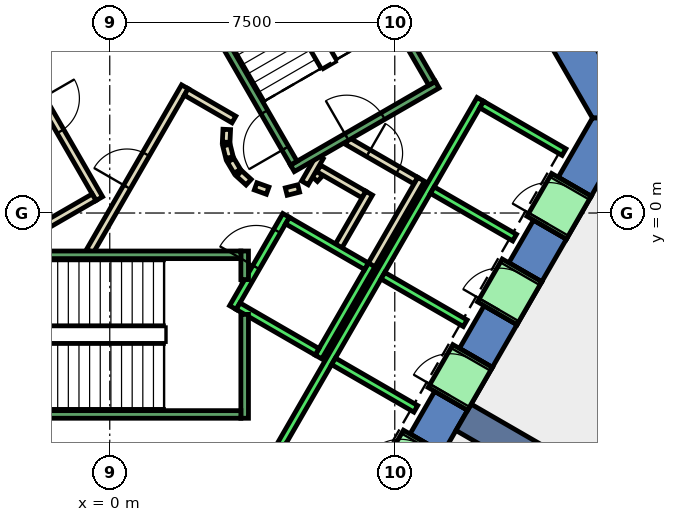
"""IFC4 building model, lengths in metres.
Left out: names, types, materials, properties, quantities, classifications, styles, units other than length and angle.
Written with IfcOpenShell. Run it as: python <this file> out.ifc"""

import sys

from ifc_helpers import new_model, si_unit, direction, frame, frame_2d, origin, place, context, subcontext, project, spatial, polyline, rectangle, outline, extrude, element, fill, save


model = new_model("IFC4")
c1 = context("Model", 3, precision=1e-05, world=origin(), true_north=direction((0.0, 1.0)))
c2 = subcontext(c1, "Body", "Model", "MODEL_VIEW")
j1 = project(units=[si_unit("LENGTHUNIT", "METRE"), si_unit("PLANEANGLEUNIT", "RADIAN")], contexts=[c1])
p1 = place(None, origin())
s1 = spatial("IfcSite", under=j1, at=p1, CompositionType="ELEMENT")
p2 = place(p1, origin())
s2 = spatial("IfcBuilding", under=s1, at=p2, CompositionType="ELEMENT")
p3 = place(p2, frame((0.0, 0.0, 60.2)))
s3 = spatial("IfcBuildingStorey", under=s2, at=p3, CompositionType="ELEMENT", Elevation=60.2)
p4 = place(p3, frame((0.0, 0.0, -0.4)))
e1 = element("IfcWall", 1, at=p4, inside=s3, PredefinedType="SHEAR", context=c2, shape_type="SweptSolid", body=[
    extrude(outline(polyline([(8.517, 11.748), (7.651, 11.248), (12.702, 2.5), (13.856, 2.5), (8.517, 11.748)])), origin(), (0.0, 0.0, 1.0), 4.2),
])
p5 = place(p3, frame((0.0, 0.0, -0.4)))
e2 = element("IfcWall", 2, at=p5, inside=s3, PredefinedType="SHEAR", context=c2, shape_type="SweptSolid", body=[
    extrude(outline(polyline([(9.417, -5.189), (8.551, -4.689), (7.902, -5.814), (8.767, -6.314), (9.417, -5.189)])), origin(), (0.0, 0.0, 1.0), 4.2),
])
p6 = place(p3, frame((0.0, 0.0, -0.4)))
e3 = element("IfcWall", 3, at=p6, inside=s3, PredefinedType="SHEAR", context=c2, shape_type="SweptSolid", body=[
    extrude(outline(polyline([(10.717, -2.937), (9.851, -2.437), (9.201, -3.563), (10.067, -4.063), (10.717, -2.937)])), origin(), (0.0, 0.0, 1.0), 4.2),
])
p7 = place(p3, frame((0.0, 0.0, -0.4)))
e4 = element("IfcWall", 4, at=p7, inside=s3, PredefinedType="SHEAR", context=c2, shape_type="SweptSolid", body=[
    extrude(outline(polyline([(12.017, -0.686), (11.151, -0.186), (10.501, -1.311), (11.367, -1.811), (12.017, -0.686)])), origin(), (0.0, 0.0, 1.0), 4.2),
])
p8 = place(p3, frame((0.0, 0.0, -0.4)))
e5 = element("IfcWall", 5, at=p8, inside=s3, PredefinedType="SHEAR", context=c2, shape_type="SweptSolid", body=[
    extrude(outline(polyline([(11.801, 0.94), (12.667, 0.44), (13.856, 2.5), (12.702, 2.5), (11.801, 0.94)])), origin(), (0.0, 0.0, 1.0), 4.2),
])
p9 = place(p3, frame((0.0, 0.0, 3.6)))
e6 = element("IfcWall", 6, at=p9, inside=s3, PredefinedType="SHEAR", context=c2, shape_type="SweptSolid", body=[
    extrude(outline(polyline([(8.767, -6.314), (7.902, -5.814), (7.252, -6.94), (8.117, -7.44), (8.767, -6.314)])), origin(), (0.0, 0.0, 1.0), 0.2),
])
p10 = place(p3, frame((0.0, 0.0, 3.6)))
e7 = element("IfcWall", 7, at=p10, inside=s3, PredefinedType="SHEAR", context=c2, shape_type="SweptSolid", body=[
    extrude(outline(polyline([(10.067, -4.063), (9.201, -3.563), (8.551, -4.689), (9.417, -5.189), (10.067, -4.063)])), origin(), (0.0, 0.0, 1.0), 0.2),
])
p11 = place(p3, frame((0.0, 0.0, 3.6)))
e8 = element("IfcWall", 8, at=p11, inside=s3, PredefinedType="SHEAR", context=c2, shape_type="SweptSolid", body=[
    extrude(outline(polyline([(11.367, -1.811), (10.501, -1.311), (9.851, -2.437), (10.717, -2.937), (11.367, -1.811)])), origin(), (0.0, 0.0, 1.0), 0.2),
])
p12 = place(p3, frame((0.0, 0.0, 3.6)))
e9 = element("IfcWall", 9, at=p12, inside=s3, PredefinedType="SHEAR", context=c2, shape_type="SweptSolid", body=[
    extrude(outline(polyline([(12.667, 0.44), (11.801, 0.94), (11.151, -0.186), (12.017, -0.686), (12.667, 0.44)])), origin(), (0.0, 0.0, 1.0), 0.2),
])
p13 = place(p3, frame((9.31, -5.375, -0.4), z_axis=(0.0, 0.0, 1.0), x_axis=(0.866017533419, -0.500013631625, 0.0)))
e10 = element("IfcWall", 10, at=p13, inside=s3, PredefinedType="SHEAR", context=c2, shape_type="SweptSolid", body=[
    extrude(rectangle(XDim=9.0, YDim=0.8, at=frame_2d((4.5, 0.0))), origin(), (0.0, 0.0, 1.0), 4.2),
])
p14 = place(p3, frame((5.39, 0.898, 0.0), z_axis=(0.0, 0.0, 1.0), x_axis=(0.673828488714, 0.738887791073, 0.0)))
e11 = element("IfcWall", 11, at=p14, inside=s3, PredefinedType="PARTITIONING", context=c2, shape_type="SweptSolid", body=[
    extrude(rectangle(XDim=0.263, YDim=0.2, at=frame_2d((0.131, 0.0))), origin(), (0.0, 0.0, 1.0), 3.8),
])
p15 = place(p3, frame((5.499, 1.172, 0.0), z_axis=(0.0, 0.0, 1.0), x_axis=(0.866333505267, -0.499465972466, 0.0)))
e12 = element("IfcWall", 12, at=p15, inside=s3, PredefinedType="PARTITIONING", context=c2, shape_type="SweptSolid", body=[
    extrude(rectangle(XDim=1.374, YDim=0.2, at=frame_2d((0.687, 0.0))), origin(), (0.0, 0.0, 1.0), 3.8),
])
p16 = place(p3, frame((6.826, 0.522, 0.0), z_axis=(0.0, 0.0, 1.0), x_axis=(-0.500016722714, -0.866015748706, 0.0)))
e13 = element("IfcWall", 13, at=p16, inside=s3, PredefinedType="PARTITIONING", context=c2, shape_type="SweptSolid", body=[
    extrude(rectangle(XDim=1.7, YDim=0.2, at=frame_2d((0.85, 0.0))), origin(), (0.0, 0.0, 1.0), 3.8),
])
p17 = place(p3, frame((6.25, 1.894, 0.0), z_axis=(0.0, 0.0, 1.0), x_axis=(0.866043184279, -0.499969202016, 0.0)))
e14 = element("IfcWall", 14, at=p17, inside=s3, PredefinedType="PARTITIONING", context=c2, shape_type="SweptSolid", body=[
    extrude(rectangle(XDim=2.084, YDim=0.2, at=frame_2d((1.042, 0.0))), origin(), (0.0, 0.0, 1.0), 3.8),
])
p18 = place(p17, frame((0.642, 0.0, 0.0)))
e15 = element("IfcOpeningElement", 15, at=p18, cuts=e14, PredefinedType="OPENING", context=c2, shape_type="SweptSolid", body=[
    extrude(rectangle(XDim=0.9, YDim=2.1, at=frame_2d((0.45, 1.05))), frame((0.0, 0.11, 0.0), z_axis=(0.0, -1.0, 0.0), x_axis=(1.0, 0.0, 0.0)), (0.0, 0.0, 1.0), 0.22),
])
p19 = place(p3, frame((8.192, 0.888, 0.0), z_axis=(0.0, 0.0, 1.0), x_axis=(-0.499940625693, -0.866059680843, 0.0)))
e16 = element("IfcWall", 16, at=p19, inside=s3, PredefinedType="PARTITIONING", context=c2, shape_type="SweptSolid", body=[
    extrude(rectangle(XDim=2.68, YDim=0.2, at=frame_2d((1.34, 0.0))), origin(), (0.0, 0.0, 1.0), 3.8),
])
p20 = place(p3, frame((5.135, 0.793, 0.0), z_axis=(0.0, 0.0, 1.0), x_axis=(0.499526442893, 0.866298639529, 0.0)))
e17 = element("IfcWall", 17, at=p20, inside=s3, PredefinedType="PARTITIONING", context=c2, shape_type="SweptSolid", body=[
    extrude(rectangle(XDim=0.791, YDim=0.2, at=frame_2d((0.396, 0.0))), origin(), (0.0, 0.0, 1.0), 3.8),
])
p21 = place(p3, frame((-0.52, -1.0, 0.0), z_axis=(0.0, 0.0, 1.0), x_axis=(0.50011622646, 0.865958290007, 0.0)))
e18 = element("IfcWall", 18, at=p21, inside=s3, PredefinedType="PARTITIONING", context=c2, shape_type="SweptSolid", body=[
    extrude(rectangle(XDim=4.991, YDim=0.2, at=frame_2d((2.496, 0.0))), origin(), (0.0, 0.0, 1.0), 3.8),
])
p22 = place(p21, frame((1.945, 0.0, 0.0)))
e19 = element("IfcOpeningElement", 19, at=p22, cuts=e18, PredefinedType="OPENING", context=c2, shape_type="SweptSolid", body=[
    extrude(rectangle(XDim=1.0, YDim=2.1, at=frame_2d((0.5, 1.05))), frame((0.0, 0.11, 0.0), z_axis=(0.0, -1.0, 0.0), x_axis=(1.0, 0.0, 0.0)), (0.0, 0.0, 1.0), 0.22),
])
p23 = place(p3, frame((2.012, 3.186, 0.0), z_axis=(0.0, 0.0, 1.0), x_axis=(0.865891012941, -0.500232699559, 0.0)))
e20 = element("IfcWall", 20, at=p23, inside=s3, PredefinedType="PARTITIONING", context=c2, shape_type="SweptSolid", body=[
    extrude(rectangle(XDim=1.449, YDim=0.2, at=frame_2d((0.725, 0.0))), origin(), (0.0, 0.0, 1.0), 3.8),
])
p24 = place(p3, frame((3.079, 2.199, 0.0), z_axis=(0.0, 0.0, 1.0), x_axis=(-0.047771483479, -0.998858290933, 0.0)))
e21 = element("IfcWall", 21, at=p24, inside=s3, PredefinedType="PARTITIONING", context=c2, shape_type="SweptSolid", body=[
    extrude(rectangle(XDim=0.337, YDim=0.2, at=frame_2d((0.169, 0.0))), origin(), (0.0, 0.0, 1.0), 3.8),
])
p25 = place(p3, frame((3.07, 1.786, 0.0), z_axis=(0.0, 0.0, 1.0), x_axis=(0.242705583207, -0.970099994784, 0.0)))
e22 = element("IfcWall", 22, at=p25, inside=s3, PredefinedType="PARTITIONING", context=c2, shape_type="SweptSolid", body=[
    extrude(rectangle(XDim=0.338, YDim=0.2, at=frame_2d((0.169, 0.0))), origin(), (0.0, 0.0, 1.0), 3.8),
])
for number, where, z_axis, x_axis in (
    (23, (3.182, 1.388, 0.0), (0.0, 0.0, 1.0), (0.512, -0.859, 0.0)),
    (24, (3.404, 1.039, 0.0), (0.0, 0.0, 1.0), (0.74, -0.672, 0.0)),
):
    element("IfcWall", number, at=place(p3, frame(where, z_axis=z_axis, x_axis=x_axis)), inside=s3, PredefinedType="PARTITIONING", context=c2, shape_type="SweptSolid", body=[
        extrude(rectangle(XDim=0.338, YDim=0.2, at=frame_2d((0.169, 0.0))), origin(), (0.0, 0.0, 1.0), 3.8),
    ])
p26 = place(p3, frame((3.838, 0.702, 0.0), z_axis=(0.0, 0.0, 1.0), x_axis=(0.941035081519, -0.338308993895, 0.0)))
e25 = element("IfcWall", 25, at=p26, inside=s3, PredefinedType="PARTITIONING", context=c2, shape_type="SweptSolid", body=[
    extrude(rectangle(XDim=0.337, YDim=0.2, at=frame_2d((0.168, 0.0))), origin(), (0.0, 0.0, 1.0), 3.8),
])
p27 = place(p3, frame((4.644, 0.564, 0.0), z_axis=(0.0, 0.0, 1.0), x_axis=(0.969929076366, 0.243387729394, 0.0)))
e26 = element("IfcWall", 26, at=p27, inside=s3, PredefinedType="PARTITIONING", context=c2, shape_type="SweptSolid", body=[
    extrude(rectangle(XDim=0.337, YDim=0.2, at=frame_2d((0.168, 0.0))), origin(), (0.0, 0.0, 1.0), 3.8),
])
p28 = place(p3, frame((-2.771, 4.7, 0.0), z_axis=(0.0, 0.0, 1.0), x_axis=(0.499969479948, -0.866043023828, 0.0)))
e27 = element("IfcWall", 27, at=p28, inside=s3, PredefinedType="PARTITIONING", context=c2, shape_type="SweptSolid", body=[
    extrude(rectangle(XDim=4.99, YDim=0.2, at=frame_2d((2.495, 0.0))), origin(), (0.0, 0.0, 1.0), 3.8),
])
p29 = place(p28, frame((1.945, 0.0, 0.0)))
e28 = element("IfcOpeningElement", 28, at=p29, cuts=e27, PredefinedType="OPENING", context=c2, shape_type="SweptSolid", body=[
    extrude(rectangle(XDim=1.0, YDim=2.1, at=frame_2d((0.5, 1.05))), frame((0.0, 0.11, 0.0), z_axis=(0.0, -1.0, 0.0), x_axis=(1.0, 0.0, 0.0)), (0.0, 0.0, 1.0), 0.22),
])
p30 = place(p3, frame((-0.412, 0.414, 0.0), z_axis=(0.0, 0.0, 1.0), x_axis=(-0.866017369001, -0.500013916395, 0.0)))
e29 = element("IfcWall", 29, at=p30, inside=s3, PredefinedType="PARTITIONING", context=c2, shape_type="SweptSolid", body=[
    extrude(rectangle(XDim=1.45, YDim=0.2, at=frame_2d((0.725, 0.0))), origin(), (0.0, 0.0, 1.0), 3.8),
])
p31 = place(p3, frame((19.81, 5.211, 0.0), z_axis=(0.0, 0.0, 1.0), x_axis=(-0.500003368273, -0.866023459102, 0.0)))
e30 = element("IfcWall", 30, at=p31, inside=s3, PredefinedType="PARTITIONING", context=c2, shape_type="SweptSolid", body=[
    extrude(rectangle(XDim=14.018, YDim=0.2, at=frame_2d((7.009, 0.0))), origin(), (0.0, 0.0, 1.0), 3.8),
])
p32 = place(p3, frame((3.24, -2.488, 0.0), z_axis=(0.0, 0.0, 1.0), x_axis=(0.49994636267, 0.866056369097, 0.0)))
e31 = element("IfcWall", 31, at=p32, inside=s3, PredefinedType="STANDARD", context=c2, shape_type="SweptSolid", body=[
    extrude(rectangle(XDim=2.8, YDim=0.2, at=frame_2d((1.4, 0.0))), origin(), (0.0, 0.0, 1.0), 3.8),
])
p33 = place(p32, frame((1.225, 0.0, 0.0)))
e32 = element("IfcOpeningElement", 32, at=p33, cuts=e31, PredefinedType="OPENING", context=c2, shape_type="SweptSolid", body=[
    extrude(rectangle(XDim=1.1, YDim=2.1, at=frame_2d((0.55, 1.05))), frame((0.0, 0.11, 0.0), z_axis=(0.0, -1.0, 0.0), x_axis=(1.0, 0.0, 0.0)), (0.0, 0.0, 1.0), 0.22),
])
p34 = place(p3, frame((5.492, -3.788, 0.0), z_axis=(0.0, 0.0, 1.0), x_axis=(0.500011755427, 0.866018616679, 0.0)))
e33 = element("IfcWall", 33, at=p34, inside=s3, PredefinedType="STANDARD", context=c2, shape_type="SweptSolid", body=[
    extrude(rectangle(XDim=2.8, YDim=0.2, at=frame_2d((1.4, 0.0))), origin(), (0.0, 0.0, 1.0), 3.8),
])
p35 = place(p3, frame((3.377, -2.452, 0.0), z_axis=(0.0, 0.0, 1.0), x_axis=(0.865955154139, -0.50012165622, 0.0)))
e34 = element("IfcWall", 34, at=p35, inside=s3, PredefinedType="STANDARD", context=c2, shape_type="SweptSolid", body=[
    extrude(rectangle(XDim=2.4, YDim=0.2, at=frame_2d((1.2, 0.0))), origin(), (0.0, 0.0, 1.0), 3.8),
])
p36 = place(p3, frame((4.677, -0.2, 0.0), z_axis=(0.0, 0.0, 1.0), x_axis=(0.865973769406, -0.500089422704, 0.0)))
e35 = element("IfcWall", 35, at=p36, inside=s3, PredefinedType="STANDARD", context=c2, shape_type="SweptSolid", body=[
    extrude(rectangle(XDim=2.399, YDim=0.2, at=frame_2d((1.2, 0.0))), origin(), (0.0, 0.0, 1.0), 3.8),
])
p37 = place(p3, frame((4.451, -6.19, 0.0), z_axis=(0.0, 0.0, 1.0), x_axis=(0.50000090737, 0.866024879913, 0.0)))
e36 = element("IfcWall", 36, at=p37, inside=s3, PredefinedType="STANDARD", context=c2, shape_type="SweptSolid", body=[
    extrude(rectangle(XDim=10.6, YDim=0.2, at=frame_2d((5.3, 0.0))), origin(), (0.0, 0.0, 1.0), 3.8),
])
for number, where, z_axis, x_axis in (
    (37, (5.888, -3.902, 0.0), (0.0, 0.0, 1.0), (0.866, -0.5, 0.0)),
    (38, (7.188, -1.65, 0.0), (0.0, 0.0, 1.0), (0.866, -0.5, 0.0)),
    (39, (8.488, 0.602, 0.0), (0.0, 0.0, 1.0), (0.866, -0.5, 0.0)),
):
    element("IfcWall", number, at=place(p3, frame(where, z_axis=z_axis, x_axis=x_axis)), inside=s3, PredefinedType="STANDARD", context=c2, shape_type="SweptSolid", body=[
        extrude(rectangle(XDim=2.5, YDim=0.2, at=frame_2d((1.25, 0.0))), origin(), (0.0, 0.0, 1.0), 3.8),
    ])
p38 = place(p3, frame((9.788, 2.853, 0.0), z_axis=(0.0, 0.0, 1.0), x_axis=(0.865998541277, -0.500046524342, 0.0)))
e40 = element("IfcWall", 40, at=p38, inside=s3, PredefinedType="STANDARD", context=c2, shape_type="SweptSolid", body=[
    extrude(rectangle(XDim=2.5, YDim=0.2, at=frame_2d((1.25, 0.0))), origin(), (0.0, 0.0, 1.0), 3.8),
])
p39 = place(p3, frame((7.598, -7.14, 0.0), z_axis=(0.0, 0.0, 1.0), x_axis=(0.500362116554, 0.865816234728, 0.0)))
e41 = element("IfcWall", 41, at=p39, inside=s3, PredefinedType="STANDARD", context=c2, shape_type="SweptSolid", body=[
    extrude(rectangle(XDim=1.299, YDim=1.2, at=frame_2d((0.65, 0.0))), origin(), (0.0, 0.0, 1.0), 2.4),
])
p40 = place(p39, frame((0.1, 0.0, 0.0)))
e42 = element("IfcOpeningElement", 42, at=p40, cuts=e41, PredefinedType="OPENING", context=c2, shape_type="SweptSolid", body=[
    extrude(rectangle(XDim=1.1, YDim=2.3, at=frame_2d((0.55, 1.15))), frame((0.0, 0.61, 0.0), z_axis=(0.0, -1.0, 0.0), x_axis=(1.0, 0.0, 0.0)), (0.0, 0.0, 1.0), 1.22),
])
p41 = place(p3, frame((8.898, -4.889, 0.0), z_axis=(0.0, 0.0, 1.0), x_axis=(0.500036693733, 0.866004217611, 0.0)))
e43 = element("IfcWall", 43, at=p41, inside=s3, PredefinedType="STANDARD", context=c2, shape_type="SweptSolid", body=[
    extrude(rectangle(XDim=1.3, YDim=1.2, at=frame_2d((0.65, 0.0))), origin(), (0.0, 0.0, 1.0), 2.4),
])
p42 = place(p41, frame((0.1, 0.0, 0.0)))
e44 = element("IfcOpeningElement", 44, at=p42, cuts=e43, PredefinedType="OPENING", context=c2, shape_type="SweptSolid", body=[
    extrude(rectangle(XDim=1.1, YDim=2.3, at=frame_2d((0.55, 1.15))), frame((0.0, 0.61, 0.0), z_axis=(0.0, -1.0, 0.0), x_axis=(1.0, 0.0, 0.0)), (0.0, 0.0, 1.0), 1.22),
])
p43 = place(p3, frame((10.198, -2.637, 0.0), z_axis=(0.0, 0.0, 1.0), x_axis=(0.49989585183, 0.866085525409, 0.0)))
e45 = element("IfcWall", 45, at=p43, inside=s3, PredefinedType="STANDARD", context=c2, shape_type="SweptSolid", body=[
    extrude(rectangle(XDim=1.3, YDim=1.2, at=frame_2d((0.65, 0.0))), origin(), (0.0, 0.0, 1.0), 2.4),
])
p44 = place(p43, frame((0.1, 0.0, 0.0)))
e46 = element("IfcOpeningElement", 46, at=p44, cuts=e45, PredefinedType="OPENING", context=c2, shape_type="SweptSolid", body=[
    extrude(rectangle(XDim=1.1, YDim=2.3, at=frame_2d((0.55, 1.15))), frame((0.0, 0.61, 0.0), z_axis=(0.0, -1.0, 0.0), x_axis=(1.0, 0.0, 0.0)), (0.0, 0.0, 1.0), 1.22),
])
p45 = place(p3, frame((11.498, -0.385, 0.0), z_axis=(0.0, 0.0, 1.0), x_axis=(0.500221244143, 0.865897630733, 0.0)))
e47 = element("IfcWall", 47, at=p45, inside=s3, PredefinedType="STANDARD", context=c2, shape_type="SweptSolid", body=[
    extrude(rectangle(XDim=1.299, YDim=1.2, at=frame_2d((0.65, 0.0))), origin(), (0.0, 0.0, 1.0), 2.4),
])
p46 = place(p45, frame((0.1, 0.0, 0.0)))
e48 = element("IfcOpeningElement", 48, at=p46, cuts=e47, PredefinedType="OPENING", context=c2, shape_type="SweptSolid", body=[
    extrude(rectangle(XDim=1.1, YDim=2.3, at=frame_2d((0.55, 1.15))), frame((0.0, 0.61, 0.0), z_axis=(0.0, -1.0, 0.0), x_axis=(1.0, 0.0, 0.0)), (0.0, 0.0, 1.0), 1.22),
])
p47 = place(p3, frame((3.55, -2.667, 0.0), z_axis=(0.0, 0.0, 1.0), x_axis=(0.0, -1.0, 0.0)))
e49 = element("IfcWall", 49, at=p47, inside=s3, PredefinedType="STANDARD", context=c2, shape_type="SweptSolid", body=[
    extrude(rectangle(XDim=2.733, YDim=0.2, at=frame_2d((1.366, 0.0))), origin(), (0.0, 0.0, 1.0), 3.8),
])
p48 = place(p3, frame((3.55, -1.0, 0.0), z_axis=(0.0, 0.0, 1.0), x_axis=(0.0, -1.0, 0.0)))
e50 = element("IfcWall", 50, at=p48, inside=s3, PredefinedType="STANDARD", context=c2, shape_type="SweptSolid", body=[
    extrude(rectangle(XDim=0.751, YDim=0.2, at=frame_2d((0.375, 0.0))), origin(), (0.0, 0.0, 1.0), 3.8),
])
p49 = place(p3, frame((-3.45, -1.1, 0.0), z_axis=(0.0, 0.0, 1.0), x_axis=(1.0, 0.0, 0.0)))
e51 = element("IfcWall", 51, at=p49, inside=s3, PredefinedType="STANDARD", context=c2, shape_type="SweptSolid", body=[
    extrude(rectangle(XDim=6.9, YDim=0.2, at=frame_2d((3.45, 0.0))), origin(), (0.0, 0.0, 1.0), 3.8),
])
p50 = place(p49, frame((0.45, 0.0, 0.0)))
e52 = element("IfcOpeningElement", 52, at=p50, cuts=e51, PredefinedType="OPENING", context=c2, shape_type="SweptSolid", body=[
    extrude(rectangle(XDim=1.1, YDim=2.2, at=frame_2d((0.55, 1.1))), frame((0.0, 0.11, 0.0), z_axis=(0.0, -1.0, 0.0), x_axis=(1.0, 0.0, 0.0)), (0.0, 0.0, 1.0), 0.22),
])
p51 = place(p3, frame((-3.45, -5.3, 0.0), z_axis=(0.0, 0.0, 1.0), x_axis=(1.0, 0.0, 0.0)))
e53 = element("IfcWall", 53, at=p51, inside=s3, PredefinedType="STANDARD", context=c2, shape_type="SweptSolid", body=[
    extrude(rectangle(XDim=6.9, YDim=0.2, at=frame_2d((3.45, 0.0))), origin(), (0.0, 0.0, 1.0), 3.8),
])
p52 = place(p3, frame((4.806, 1.176, 0.0), z_axis=(0.0, 0.0, 1.0), x_axis=(0.866059941101, 0.499940174841, 0.0)))
e54 = element("IfcWall", 54, at=p52, inside=s3, PredefinedType="STANDARD", context=c2, shape_type="SweptSolid", body=[
    extrude(rectangle(XDim=4.4, YDim=0.2, at=frame_2d((2.2, 0.0))), origin(), (0.0, 0.0, 1.0), 3.8),
])
p53 = place(p52, frame((1.65, 0.0, 0.0)))
e55 = element("IfcOpeningElement", 55, at=p53, cuts=e54, PredefinedType="OPENING", context=c2, shape_type="SweptSolid", body=[
    extrude(rectangle(XDim=1.1, YDim=2.2, at=frame_2d((0.55, 1.1))), frame((0.0, 0.11, 0.0), z_axis=(0.0, -1.0, 0.0), x_axis=(1.0, 0.0, 0.0)), (0.0, 0.0, 1.0), 0.22),
])
p54 = place(p3, frame((4.843, 1.312, 0.0), z_axis=(0.0, 0.0, 1.0), x_axis=(-0.499963383562, 0.866046543262, 0.0)))
e56 = element("IfcWall", 56, at=p54, inside=s3, PredefinedType="STANDARD", context=c2, shape_type="SweptSolid", body=[
    extrude(rectangle(XDim=6.9, YDim=0.2, at=frame_2d((3.45, 0.0))), origin(), (0.0, 0.0, 1.0), 3.8),
])
p55 = place(p54, frame((0.45, 0.0, 0.0)))
e57 = element("IfcOpeningElement", 57, at=p55, cuts=e56, PredefinedType="OPENING", context=c2, shape_type="SweptSolid", body=[
    extrude(rectangle(XDim=1.1, YDim=2.2, at=frame_2d((0.55, 1.1))), frame((0.0, 0.11, 0.0), z_axis=(0.0, -1.0, 0.0), x_axis=(1.0, 0.0, 0.0)), (0.0, 0.0, 1.0), 0.22),
])
p56 = place(p3, frame((8.48, 3.412, 0.0), z_axis=(0.0, 0.0, 1.0), x_axis=(-0.499978703459, 0.866037698999, 0.0)))
e58 = element("IfcWall", 58, at=p56, inside=s3, PredefinedType="STANDARD", context=c2, shape_type="SweptSolid", body=[
    extrude(rectangle(XDim=6.9, YDim=0.2, at=frame_2d((3.45, 0.0))), origin(), (0.0, 0.0, 1.0), 3.8),
])
p57 = place(p3, frame((-1.393, 7.288, 0.0), z_axis=(0.0, 0.0, 1.0), x_axis=(-0.499963383562, -0.866046543262, 0.0)))
e59 = element("IfcWall", 59, at=p57, inside=s3, PredefinedType="STANDARD", context=c2, shape_type="SweptSolid", body=[
    extrude(rectangle(XDim=6.9, YDim=0.2, at=frame_2d((3.45, 0.0))), origin(), (0.0, 0.0, 1.0), 3.8),
])
p58 = place(p57, frame((0.45, 0.0, 0.0)))
e60 = element("IfcOpeningElement", 60, at=p58, cuts=e59, PredefinedType="OPENING", context=c2, shape_type="SweptSolid", body=[
    extrude(rectangle(XDim=1.1, YDim=2.2, at=frame_2d((0.55, 1.1))), frame((0.0, 0.11, 0.0), z_axis=(0.0, -1.0, 0.0), x_axis=(1.0, 0.0, 0.0)), (0.0, 0.0, 1.0), 0.22),
])
p59 = place(p22, origin())
e61 = element("IfcDoor", 61, at=p59, inside=s3, OperationType="SINGLE_SWING_LEFT", PredefinedType="DOOR", context=c2, shape_type="SweptSolid", body=[
    extrude(rectangle(XDim=1.0, YDim=2.1, at=frame_2d((0.5, 1.05))), frame((0.0, 0.025, 0.0), z_axis=(0.0, -1.0, 0.0), x_axis=(1.0, 0.0, 0.0)), (0.0, 0.0, 1.0), 0.05),
])
fill(e19, e61)
p60 = place(p29, origin())
e62 = element("IfcDoor", 62, at=p60, inside=s3, OperationType="SINGLE_SWING_RIGHT", PredefinedType="DOOR", context=c2, shape_type="SweptSolid", body=[
    extrude(rectangle(XDim=1.0, YDim=2.1, at=frame_2d((0.5, 1.05))), frame((0.0, 0.025, 0.0), z_axis=(0.0, -1.0, 0.0), x_axis=(1.0, 0.0, 0.0)), (0.0, 0.0, 1.0), 0.05),
])
fill(e28, e62)
p61 = place(p18, origin())
e63 = element("IfcDoor", 63, at=p61, inside=s3, OperationType="SINGLE_SWING_LEFT", PredefinedType="DOOR", context=c2, shape_type="SweptSolid", body=[
    extrude(rectangle(XDim=0.9, YDim=2.1, at=frame_2d((0.45, 1.05))), frame((0.0, 0.025, 0.0), z_axis=(0.0, -1.0, 0.0), x_axis=(1.0, 0.0, 0.0)), (0.0, 0.0, 1.0), 0.05),
])
fill(e15, e63)
p62 = place(p42, origin())
e64 = element("IfcDoor", 64, at=p62, inside=s3, OperationType="SLIDING_TO_LEFT", PredefinedType="DOOR", context=c2, shape_type="SweptSolid", body=[
    extrude(rectangle(XDim=1.1, YDim=2.3, at=frame_2d((0.55, 1.15))), frame((0.0, 0.025, 0.0), z_axis=(0.0, -1.0, 0.0), x_axis=(1.0, 0.0, 0.0)), (0.0, 0.0, 1.0), 0.05),
])
fill(e44, e64)
p63 = place(p44, origin())
e65 = element("IfcDoor", 65, at=p63, inside=s3, OperationType="SLIDING_TO_LEFT", PredefinedType="DOOR", context=c2, shape_type="SweptSolid", body=[
    extrude(rectangle(XDim=1.1, YDim=2.3, at=frame_2d((0.55, 1.15))), frame((0.0, 0.025, 0.0), z_axis=(0.0, -1.0, 0.0), x_axis=(1.0, 0.0, 0.0)), (0.0, 0.0, 1.0), 0.05),
])
fill(e46, e65)
p64 = place(p46, origin())
e66 = element("IfcDoor", 66, at=p64, inside=s3, OperationType="SLIDING_TO_LEFT", PredefinedType="DOOR", context=c2, shape_type="SweptSolid", body=[
    extrude(rectangle(XDim=1.1, YDim=2.3, at=frame_2d((0.55, 1.15))), frame((0.0, 0.025, 0.0), z_axis=(0.0, -1.0, 0.0), x_axis=(1.0, 0.0, 0.0)), (0.0, 0.0, 1.0), 0.05),
])
fill(e48, e66)
p65 = place(p33, origin())
e67 = element("IfcDoor", 67, at=p65, inside=s3, OperationType="SLIDING_TO_LEFT", PredefinedType="DOOR", context=c2, shape_type="SweptSolid", body=[
    extrude(rectangle(XDim=1.1, YDim=2.1, at=frame_2d((0.55, 1.05))), frame((0.0, 0.025, 0.0), z_axis=(0.0, -1.0, 0.0), x_axis=(1.0, 0.0, 0.0)), (0.0, 0.0, 1.0), 0.05),
])
fill(e32, e67)
p66 = place(p55, origin())
e68 = element("IfcDoor", 68, at=p66, inside=s3, OperationType="SINGLE_SWING_LEFT", PredefinedType="DOOR", context=c2, shape_type="SweptSolid", body=[
    extrude(rectangle(XDim=1.1, YDim=2.2, at=frame_2d((0.55, 1.1))), frame((0.0, 0.025, 0.0), z_axis=(0.0, -1.0, 0.0), x_axis=(1.0, 0.0, 0.0)), (0.0, 0.0, 1.0), 0.05),
])
fill(e57, e68)
p67 = place(p53, origin())
e69 = element("IfcDoor", 69, at=p67, inside=s3, OperationType="SINGLE_SWING_LEFT", PredefinedType="DOOR", context=c2, shape_type="SweptSolid", body=[
    extrude(rectangle(XDim=1.1, YDim=2.2, at=frame_2d((0.55, 1.1))), frame((0.0, 0.025, 0.0), z_axis=(0.0, -1.0, 0.0), x_axis=(1.0, 0.0, 0.0)), (0.0, 0.0, 1.0), 0.05),
])
fill(e55, e69)
save(model, sys.argv[1])
